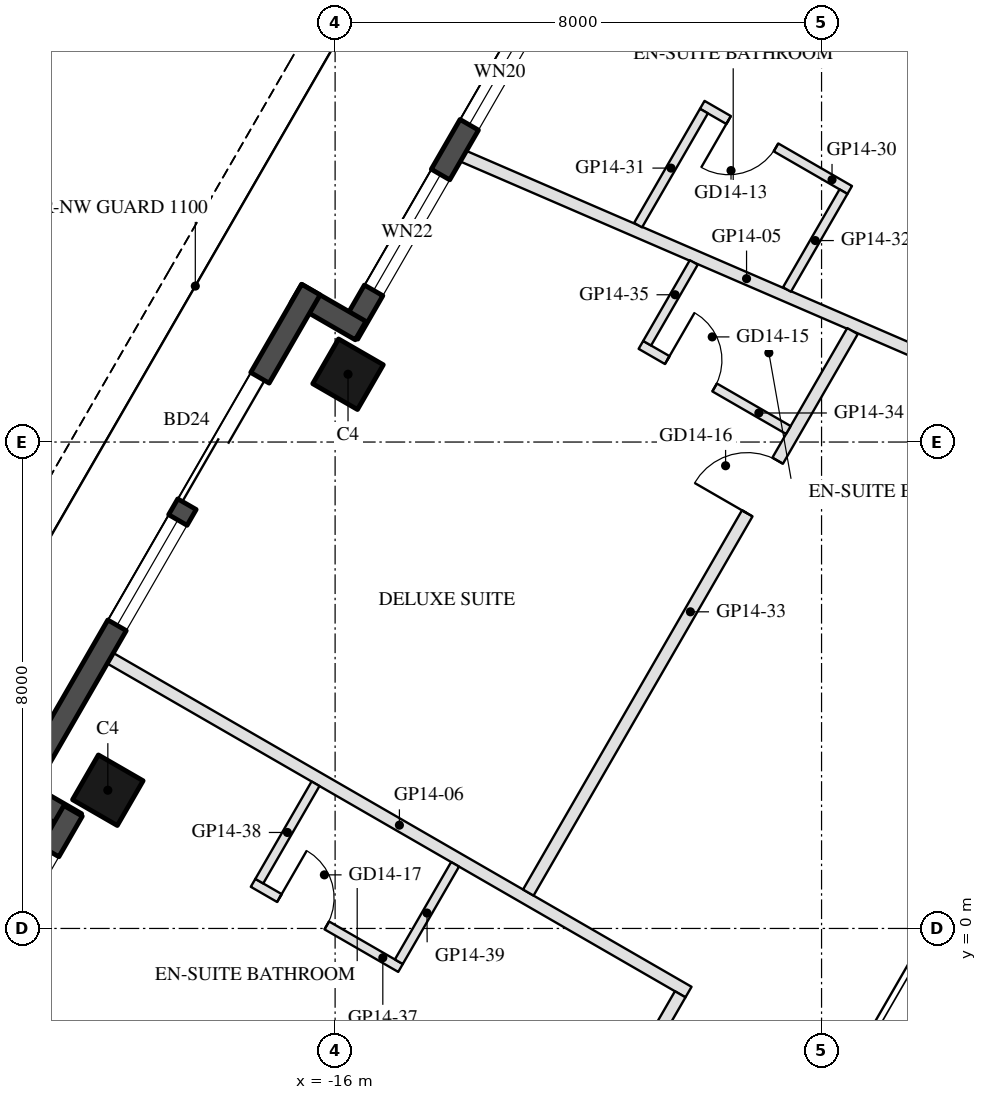
"""IFC4 building model, lengths in metres.
Left out: names, types, materials, properties, quantities, classifications, styles, units other than length and angle.
Written with IfcOpenShell. Run it as: python <this file> out.ifc"""

import sys

from ifc_helpers import new_model, si_unit, direction, frame, frame_2d, origin, origin_2d, place, context, subcontext, project, spatial, rectangle, hollow_rectangle, extrude, element, fill, save


model = new_model("IFC4")
c1 = context("Model", 3, precision=1e-05, world=origin(), true_north=direction((0.0, 1.0)))
c2 = subcontext(c1, "Body", "Model", "MODEL_VIEW")
j1 = project(units=[si_unit("LENGTHUNIT", "METRE"), si_unit("PLANEANGLEUNIT", "RADIAN")], contexts=[c1])
p1 = place(None, origin())
s1 = spatial("IfcSite", under=j1, at=p1, CompositionType="ELEMENT")
p2 = place(p1, origin())
s2 = spatial("IfcBuilding", under=s1, at=p2, CompositionType="ELEMENT")
p3 = place(p2, frame((0.0, 0.0, 165.1)))
s3 = spatial("IfcBuildingStorey", under=s2, at=p3, CompositionType="ELEMENT", Elevation=165.1)
for number, where, z_axis, x_axis in (
    (1, (-15.788, 9.115, 0.0), (0.0, 0.0, 1.0), (0.5, 0.866, 0.0)),
    (2, (-19.738, 2.273, 0.0), (0.0, 0.0, 1.0), (0.5, 0.866, 0.0)),
):
    element("IfcColumn", number, at=place(p3, frame(where, z_axis=z_axis, x_axis=x_axis)), inside=s3, PredefinedType="COLUMN", context=c2, shape_type="SweptSolid", body=[
        extrude(hollow_rectangle(XDim=0.85, YDim=0.85, WallThickness=0.04, at=origin_2d()), origin(), (0.0, 0.0, 1.0), 3.7),
    ])
p4 = place(p3, frame((-12.409, 15.617, 0.0), z_axis=(0.0, 0.0, 1.0), x_axis=(-0.500003597184, -0.866023326939, 0.0)))
e3 = element("IfcWall", 3, at=p4, inside=s3, PredefinedType="SOLIDWALL", context=c2, shape_type="SweptSolid", body=[
    extrude(rectangle(XDim=6.74, YDim=0.35, at=frame_2d((3.37, 0.0))), origin(), (0.0, 0.0, 1.0), 3.55),
])
p5 = place(p4, frame((0.77, 0.0, 0.3)))
e4 = element("IfcOpeningElement", 4, at=p5, cuts=e3, PredefinedType="OPENING", context=c2, shape_type="SweptSolid", body=[
    extrude(rectangle(XDim=2.0, YDim=2.65, at=frame_2d((1.0, 1.325))), frame((0.0, 0.185, 0.0), z_axis=(0.0, -1.0, 0.0), x_axis=(1.0, 0.0, 0.0)), (0.0, 0.0, 1.0), 0.37),
])
p6 = place(p4, frame((3.715, 0.0, 0.3)))
e5 = element("IfcOpeningElement", 5, at=p6, cuts=e3, PredefinedType="OPENING", context=c2, shape_type="SweptSolid", body=[
    extrude(rectangle(XDim=2.2, YDim=2.65, at=frame_2d((1.1, 1.325))), frame((0.0, 0.185, 0.0), z_axis=(0.0, -1.0, 0.0), x_axis=(1.0, 0.0, 0.0)), (0.0, 0.0, 1.0), 0.37),
])
p7 = place(p3, frame((-15.581, 9.833, 0.0), z_axis=(0.0, 0.0, 1.0), x_axis=(-0.866055662726, 0.499947586314, 0.0)))
e6 = element("IfcWall", 6, at=p7, inside=s3, PredefinedType="SOLIDWALL", context=c2, shape_type="SweptSolid", body=[
    extrude(rectangle(XDim=1.22, YDim=0.35, at=frame_2d((0.61, 0.0))), origin(), (0.0, 0.0, 1.0), 3.55),
])
p8 = place(p3, frame((-16.398, 10.507, 0.0), z_axis=(0.0, 0.0, 1.0), x_axis=(-0.499999142773, -0.866025898704, 0.0)))
e7 = element("IfcWall", 7, at=p8, inside=s3, PredefinedType="SOLIDWALL", context=c2, shape_type="SweptSolid", body=[
    extrude(rectangle(XDim=9.7, YDim=0.35, at=frame_2d((4.85, 0.0))), origin(), (0.0, 0.0, 1.0), 3.55),
])
p9 = place(p8, frame((1.675, 0.0, 0.0)))
e8 = element("IfcOpeningElement", 8, at=p9, cuts=e7, PredefinedType="OPENING", context=c2, shape_type="SweptSolid", body=[
    extrude(rectangle(XDim=2.4, YDim=2.4, at=frame_2d((1.2, 1.2))), frame((0.0, 0.185, 0.0), z_axis=(0.0, -1.0, 0.0), x_axis=(1.0, 0.0, 0.0)), (0.0, 0.0, 1.0), 0.37),
])
p10 = place(p8, frame((4.375, 0.0, 0.3)))
e9 = element("IfcOpeningElement", 9, at=p10, cuts=e7, PredefinedType="OPENING", context=c2, shape_type="SweptSolid", body=[
    extrude(rectangle(XDim=2.0, YDim=2.65, at=frame_2d((1.0, 1.325))), frame((0.0, 0.185, 0.0), z_axis=(0.0, -1.0, 0.0), x_axis=(1.0, 0.0, 0.0)), (0.0, 0.0, 1.0), 0.37),
])
p11 = place(p3, frame((-21.312, 2.346, 0.0), z_axis=(0.0, 0.0, 1.0), x_axis=(0.866005645448, -0.500034220881, 0.0)))
e10 = element("IfcWall", 10, at=p11, inside=s3, PredefinedType="SOLIDWALL", context=c2, shape_type="SweptSolid", body=[
    extrude(rectangle(XDim=1.22, YDim=0.35, at=frame_2d((0.61, 0.0))), origin(), (0.0, 0.0, 1.0), 3.55),
])
p12 = place(p3, frame((-20.309, 1.934, 0.0), z_axis=(0.0, 0.0, 1.0), x_axis=(-0.499992114976, -0.866029956157, 0.0)))
e11 = element("IfcWall", 11, at=p12, inside=s3, PredefinedType="SOLIDWALL", context=c2, shape_type="SweptSolid", body=[
    extrude(rectangle(XDim=6.74, YDim=0.35, at=frame_2d((3.37, 0.0))), origin(), (0.0, 0.0, 1.0), 3.55),
])
p13 = place(p12, frame((4.02, 0.0, 0.0)))
e12 = element("IfcOpeningElement", 12, at=p13, cuts=e11, PredefinedType="OPENING", context=c2, shape_type="SweptSolid", body=[
    extrude(rectangle(XDim=2.4, YDim=2.4, at=frame_2d((1.2, 1.2))), frame((0.0, 0.185, 0.0), z_axis=(0.0, -1.0, 0.0), x_axis=(1.0, 0.0, 0.0)), (0.0, 0.0, 1.0), 0.37),
])
p14 = place(p12, frame((0.77, 0.0, 0.3)))
e13 = element("IfcOpeningElement", 13, at=p14, cuts=e11, PredefinedType="OPENING", context=c2, shape_type="SweptSolid", body=[
    extrude(rectangle(XDim=2.9, YDim=2.65, at=frame_2d((1.45, 1.325))), frame((0.0, 0.185, 0.0), z_axis=(0.0, -1.0, 0.0), x_axis=(1.0, 0.0, 0.0)), (0.0, 0.0, 1.0), 0.37),
])
p15 = place(p3, frame((-13.89, 12.701, 0.0), z_axis=(0.0, 0.0, 1.0), x_axis=(0.917850876745, -0.396925393566, 0.0)))
e14 = element("IfcWall", 14, at=p15, inside=s3, PredefinedType="PARTITIONING", context=c2, shape_type="SweptSolid", body=[
    extrude(rectangle(XDim=10.147, YDim=0.2, at=frame_2d((5.074, 0.0))), origin(), (0.0, 0.0, 1.0), 2.95),
])
p16 = place(p3, frame((-19.697, 4.444, 0.0), z_axis=(0.0, 0.0, 1.0), x_axis=(0.866027479907, -0.499996404033, 0.0)))
e15 = element("IfcWall", 15, at=p16, inside=s3, PredefinedType="PARTITIONING", context=c2, shape_type="SweptSolid", body=[
    extrude(rectangle(XDim=10.98, YDim=0.2, at=frame_2d((5.49, 0.0))), origin(), (0.0, 0.0, 1.0), 3.06),
])
p17 = place(p3, frame((-7.537, 12.146, 0.0), z_axis=(0.0, 0.0, 1.0), x_axis=(-0.866034573852, 0.49998411664, 0.0)))
e16 = element("IfcWall", 16, at=p17, inside=s3, PredefinedType="PARTITIONING", context=c2, shape_type="SweptSolid", body=[
    extrude(rectangle(XDim=2.8, YDim=0.15, at=frame_2d((1.4, 0.0))), origin(), (0.0, 0.0, 1.0), 3.55),
])
p18 = place(p17, frame((1.4, 0.0, 0.0)))
e17 = element("IfcOpeningElement", 17, at=p18, cuts=e16, PredefinedType="OPENING", context=c2, shape_type="SweptSolid", body=[
    extrude(rectangle(XDim=0.9, YDim=2.1, at=frame_2d((0.45, 1.05))), frame((0.0, 0.085, 0.0), z_axis=(0.0, -1.0, 0.0), x_axis=(1.0, 0.0, 0.0)), (0.0, 0.0, 1.0), 0.17),
])
p19 = place(p3, frame((-9.934, 13.443, 0.0), z_axis=(0.0, 0.0, 1.0), x_axis=(-0.500018419339, -0.866014769113, 0.0)))
e18 = element("IfcWall", 18, at=p19, inside=s3, PredefinedType="PARTITIONING", context=c2, shape_type="SweptSolid", body=[
    extrude(rectangle(XDim=2.166, YDim=0.15, at=frame_2d((1.083, 0.0))), origin(), (0.0, 0.0, 1.0), 3.55),
])
p20 = place(p3, frame((-7.639, 12.118, 0.0), z_axis=(0.0, 0.0, 1.0), x_axis=(-0.500052179009, -0.865995276124, 0.0)))
e19 = element("IfcWall", 19, at=p20, inside=s3, PredefinedType="PARTITIONING", context=c2, shape_type="SweptSolid", body=[
    extrude(rectangle(XDim=1.859, YDim=0.15, at=frame_2d((0.929, 0.0))), origin(), (0.0, 0.0, 1.0), 3.55),
])
p21 = place(p3, frame((-12.823, 0.591, 0.0), z_axis=(0.0, 0.0, 1.0), x_axis=(0.500005210312, 0.866022395588, 0.0)))
e20 = element("IfcWall", 20, at=p21, inside=s3, PredefinedType="PARTITIONING", context=c2, shape_type="SweptSolid", body=[
    extrude(rectangle(XDim=10.663, YDim=0.2, at=frame_2d((5.332, 0.0))), origin(), (0.0, 0.0, 1.0), 2.95),
])
p22 = place(p21, frame((7.201, 0.0, 0.0)))
e21 = element("IfcOpeningElement", 21, at=p22, cuts=e20, PredefinedType="OPENING", context=c2, shape_type="SweptSolid", body=[
    extrude(rectangle(XDim=1.0, YDim=2.1, at=frame_2d((0.5, 1.05))), frame((0.0, 0.11, 0.0), z_axis=(0.0, -1.0, 0.0), x_axis=(1.0, 0.0, 0.0)), (0.0, 0.0, 1.0), 0.22),
])
p23 = place(p3, frame((-10.971, 9.598, 0.0), z_axis=(0.0, 0.0, 1.0), x_axis=(0.865996816683, -0.500049511043, 0.0)))
e22 = element("IfcWall", 22, at=p23, inside=s3, PredefinedType="PARTITIONING", context=c2, shape_type="SweptSolid", body=[
    extrude(rectangle(XDim=2.8, YDim=0.15, at=frame_2d((1.4, 0.0))), origin(), (0.0, 0.0, 1.0), 3.55),
])
p24 = place(p23, frame((0.5, 0.0, 0.0)))
e23 = element("IfcOpeningElement", 23, at=p24, cuts=e22, PredefinedType="OPENING", context=c2, shape_type="SweptSolid", body=[
    extrude(rectangle(XDim=0.9, YDim=2.1, at=frame_2d((0.45, 1.05))), frame((0.0, 0.085, 0.0), z_axis=(0.0, -1.0, 0.0), x_axis=(1.0, 0.0, 0.0)), (0.0, 0.0, 1.0), 0.17),
])
p25 = place(p3, frame((-10.102, 10.954, 0.0), z_axis=(0.0, 0.0, 1.0), x_axis=(-0.499956687145, -0.866050409029, 0.0)))
e24 = element("IfcWall", 24, at=p25, inside=s3, PredefinedType="PARTITIONING", context=c2, shape_type="SweptSolid", body=[
    extrude(rectangle(XDim=1.534, YDim=0.15, at=frame_2d((0.767, 0.0))), origin(), (0.0, 0.0, 1.0), 2.95),
])
p26 = place(p3, frame((-12.269, -4.45, 0.0), z_axis=(0.0, 0.0, 1.0), x_axis=(0.500008716408, 0.866020371305, 0.0)))
e25 = element("IfcWall", 25, at=p26, inside=s3, PredefinedType="PARTITIONING", context=c2, shape_type="SweptSolid", body=[
    extrude(rectangle(XDim=3.888, YDim=0.2, at=frame_2d((1.944, 0.0))), origin(), (0.0, 0.0, 1.0), 2.95),
])
p27 = place(p26, frame((1.444, 0.0, 0.0)))
e26 = element("IfcOpeningElement", 26, at=p27, cuts=e25, PredefinedType="OPENING", context=c2, shape_type="SweptSolid", body=[
    extrude(rectangle(XDim=1.0, YDim=2.1, at=frame_2d((0.5, 1.05))), frame((0.0, 0.11, 0.0), z_axis=(0.0, -1.0, 0.0), x_axis=(1.0, 0.0, 0.0)), (0.0, 0.0, 1.0), 0.22),
])
p28 = place(p3, frame((-17.349, 0.75, 0.0), z_axis=(0.0, 0.0, 1.0), x_axis=(0.866056369097, -0.49994636267, 0.0)))
e27 = element("IfcWall", 27, at=p28, inside=s3, PredefinedType="PARTITIONING", context=c2, shape_type="SweptSolid", body=[
    extrude(rectangle(XDim=2.8, YDim=0.15, at=frame_2d((1.4, 0.0))), origin(), (0.0, 0.0, 1.0), 2.95),
])
p29 = place(p28, frame((0.5, 0.0, 0.0)))
e28 = element("IfcOpeningElement", 28, at=p29, cuts=e27, PredefinedType="OPENING", context=c2, shape_type="SweptSolid", body=[
    extrude(rectangle(XDim=0.9, YDim=2.1, at=frame_2d((0.45, 1.05))), frame((0.0, 0.085, 0.0), z_axis=(0.0, -1.0, 0.0), x_axis=(1.0, 0.0, 0.0)), (0.0, 0.0, 1.0), 0.17),
])
for number, where, z_axis, x_axis in (
    (29, (-16.322, 2.38, 0.0), (0.0, 0.0, 1.0), (-0.5, -0.866, 0.0)),
    (30, (-14.027, 1.055, 0.0), (0.0, 0.0, 1.0), (-0.5, -0.866, 0.0)),
):
    element("IfcWall", number, at=place(p3, frame(where, z_axis=z_axis, x_axis=x_axis)), inside=s3, PredefinedType="PARTITIONING", context=c2, shape_type="SweptSolid", body=[
        extrude(rectangle(XDim=1.85, YDim=0.15, at=frame_2d((0.925, 0.0))), origin(), (0.0, 0.0, 1.0), 2.95),
    ])
p30 = place(p5, origin())
e31 = element("IfcWindow", 31, at=p30, inside=s3, PartitioningType="SINGLE_PANEL", PredefinedType="WINDOW", context=c2, shape_type="SweptSolid", body=[
    extrude(rectangle(XDim=2.0, YDim=2.65, at=frame_2d((1.0, 1.325))), frame((0.0, 0.03, 0.0), z_axis=(0.0, -1.0, 0.0), x_axis=(1.0, 0.0, 0.0)), (0.0, 0.0, 1.0), 0.06),
])
fill(e4, e31)
p31 = place(p6, origin())
e32 = element("IfcWindow", 32, at=p31, inside=s3, PartitioningType="SINGLE_PANEL", PredefinedType="WINDOW", context=c2, shape_type="SweptSolid", body=[
    extrude(rectangle(XDim=2.2, YDim=2.65, at=frame_2d((1.1, 1.325))), frame((0.0, 0.03, 0.0), z_axis=(0.0, -1.0, 0.0), x_axis=(1.0, 0.0, 0.0)), (0.0, 0.0, 1.0), 0.06),
])
fill(e5, e32)
p32 = place(p9, frame((2.4, 0.0, 0.0), z_axis=(0.0, 0.0, 1.0), x_axis=(-1.0, 0.0, 0.0)))
e33 = element("IfcDoor", 33, at=p32, inside=s3, OperationType="SLIDING_TO_LEFT", PredefinedType="DOOR", context=c2, shape_type="SweptSolid", body=[
    extrude(rectangle(XDim=2.4, YDim=2.4, at=frame_2d((1.2, 1.2))), frame((0.0, 0.025, 0.0), z_axis=(0.0, -1.0, 0.0), x_axis=(1.0, 0.0, 0.0)), (0.0, 0.0, 1.0), 0.05),
])
fill(e8, e33)
p33 = place(p10, origin())
e34 = element("IfcWindow", 34, at=p33, inside=s3, PartitioningType="SINGLE_PANEL", PredefinedType="WINDOW", context=c2, shape_type="SweptSolid", body=[
    extrude(rectangle(XDim=2.0, YDim=2.65, at=frame_2d((1.0, 1.325))), frame((0.0, 0.03, 0.0), z_axis=(0.0, -1.0, 0.0), x_axis=(1.0, 0.0, 0.0)), (0.0, 0.0, 1.0), 0.06),
])
fill(e9, e34)
p34 = place(p18, origin())
e35 = element("IfcDoor", 35, at=p34, inside=s3, OperationType="SINGLE_SWING_RIGHT", PredefinedType="DOOR", context=c2, shape_type="SweptSolid", body=[
    extrude(rectangle(XDim=0.9, YDim=2.1, at=frame_2d((0.45, 1.05))), frame((0.0, 0.025, 0.0), z_axis=(0.0, -1.0, 0.0), x_axis=(1.0, 0.0, 0.0)), (0.0, 0.0, 1.0), 0.05),
])
fill(e17, e35)
p35 = place(p24, origin())
e36 = element("IfcDoor", 36, at=p35, inside=s3, OperationType="SINGLE_SWING_LEFT", PredefinedType="DOOR", context=c2, shape_type="SweptSolid", body=[
    extrude(rectangle(XDim=0.9, YDim=2.1, at=frame_2d((0.45, 1.05))), frame((0.0, 0.025, 0.0), z_axis=(0.0, -1.0, 0.0), x_axis=(1.0, 0.0, 0.0)), (0.0, 0.0, 1.0), 0.05),
])
fill(e23, e36)
p36 = place(p22, origin())
e37 = element("IfcDoor", 37, at=p36, inside=s3, OperationType="SINGLE_SWING_LEFT", PredefinedType="DOOR", context=c2, shape_type="SweptSolid", body=[
    extrude(rectangle(XDim=1.0, YDim=2.1, at=frame_2d((0.5, 1.05))), frame((0.0, 0.025, 0.0), z_axis=(0.0, -1.0, 0.0), x_axis=(1.0, 0.0, 0.0)), (0.0, 0.0, 1.0), 0.05),
])
fill(e21, e37)
p37 = place(p29, origin())
e38 = element("IfcDoor", 38, at=p37, inside=s3, OperationType="SINGLE_SWING_LEFT", PredefinedType="DOOR", context=c2, shape_type="SweptSolid", body=[
    extrude(rectangle(XDim=0.9, YDim=2.1, at=frame_2d((0.45, 1.05))), frame((0.0, 0.025, 0.0), z_axis=(0.0, -1.0, 0.0), x_axis=(1.0, 0.0, 0.0)), (0.0, 0.0, 1.0), 0.05),
])
fill(e28, e38)
save(model, sys.argv[1])
